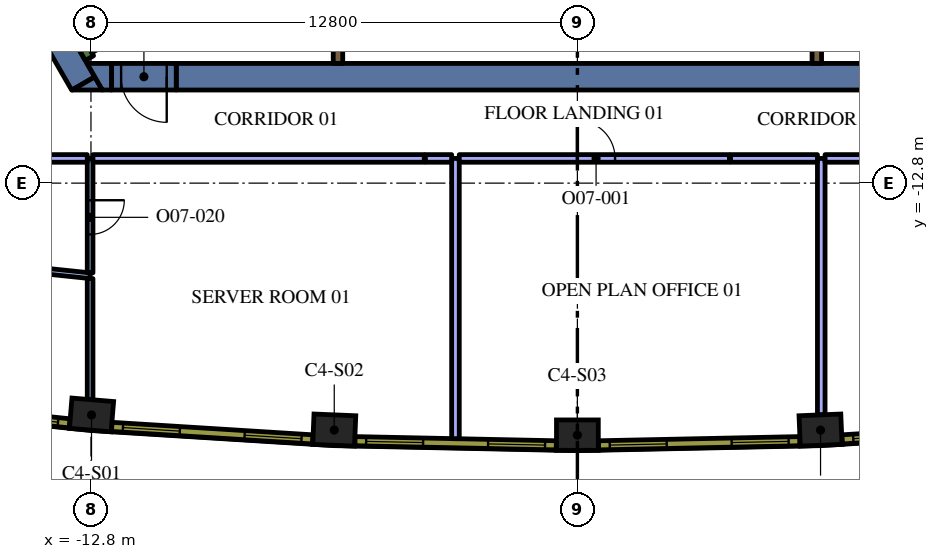
"""IFC4 building model, lengths in metres.
Left out: names, types, materials, properties, quantities, classifications, styles, units other than length and angle.
Written with IfcOpenShell. Run it as: python <this file> out.ifc"""

import sys

from ifc_helpers import new_model, si_unit, direction, frame, frame_2d, origin, origin_2d, place, context, subcontext, project, spatial, polyline, rectangle, outline, extrude, element, fill, save


model = new_model("IFC4")
c1 = context("Model", 3, precision=1e-05, world=origin(), true_north=direction((0.0, 1.0)))
c2 = subcontext(c1, "Body", "Model", "MODEL_VIEW")
j1 = project(units=[si_unit("LENGTHUNIT", "METRE"), si_unit("PLANEANGLEUNIT", "RADIAN")], contexts=[c1])
p1 = place(None, origin())
s1 = spatial("IfcSite", under=j1, at=p1, CompositionType="ELEMENT")
p2 = place(p1, origin())
s2 = spatial("IfcBuilding", under=s1, at=p2, CompositionType="ELEMENT")
p3 = place(p2, frame((0.0, 0.0, 214.2)))
s3 = spatial("IfcBuildingStorey", under=s2, at=p3, CompositionType="ELEMENT", Elevation=214.2)
for number, where, z_axis, x_axis in (
    (1, (-12.785, -18.9, 0.0), (0.0, 0.0, 1.0), (0.997, -0.083, 0.0)),
    (2, (-6.398, -19.298, 0.0), (0.0, 0.0, 1.0), (0.999, -0.041, 0.0)),
    (3, (0.0, -19.431, 0.0), (0.0, 0.0, 1.0), (1.0, 0.0, 0.0)),
    (4, (6.398, -19.298, 0.0), (0.0, 0.0, 1.0), (0.999, 0.041, 0.0)),
):
    element("IfcColumn", number, at=place(p3, frame(where, z_axis=z_axis, x_axis=x_axis)), inside=s3, PredefinedType="COLUMN", context=c2, shape_type="SweptSolid", body=[
        extrude(rectangle(XDim=1.1, YDim=0.8, at=origin_2d()), origin(), (0.0, 0.0, 1.0), 4.2),
    ])
p4 = place(p3, frame((-14.917, -6.863, 0.0), z_axis=(0.0, 0.0, 1.0), x_axis=(0.499972675833, -0.866041178825, 0.0)))
e5 = element("IfcWall", 5, at=p4, inside=s3, PredefinedType="SOLIDWALL", context=c2, shape_type="SweptSolid", body=[
    extrude(rectangle(XDim=3.829, YDim=0.7, at=frame_2d((1.915, 0.0))), origin(), (0.0, 0.0, 1.0), 4.2),
])
p5 = place(p3, origin())
e6 = element("IfcWall", 6, at=p5, inside=s3, PredefinedType="SOLIDWALL", context=c2, shape_type="SweptSolid", body=[
    extrude(outline(polyline([(-12.5, -10.35), (-13.296, -10.35), (-12.698, -10.005), (-12.5, -10.35)])), origin(), (0.0, 0.0, 1.0), 4.2),
])
e7 = element("IfcWall", 7, at=p5, inside=s3, PredefinedType="SOLIDWALL", context=c2, shape_type="SweptSolid", body=[
    extrude(outline(polyline([(-12.257, -10.35), (-12.5, -10.35), (-12.904, -9.65), (-12.257, -9.65), (-12.257, -10.35)])), origin(), (0.0, 0.0, 1.0), 4.2),
])
p6 = place(p3, frame((-10.556, -10.0, 0.0), z_axis=(0.0, 0.0, 1.0), x_axis=(1.0, 0.0, 0.0)))
e8 = element("IfcWall", 8, at=p6, inside=s3, PredefinedType="SOLIDWALL", context=c2, shape_type="SweptSolid", body=[
    extrude(rectangle(XDim=19.461, YDim=0.7, at=frame_2d((9.73, 0.0))), origin(), (0.0, 0.0, 1.0), 4.2),
])
p7 = place(p3, frame((12.84, -9.261, 0.0), z_axis=(0.0, 0.0, 1.0), x_axis=(-0.866013990052, 0.500019768644, 0.0)))
e9 = element("IfcWall", 9, at=p7, inside=s3, PredefinedType="SOLIDWALL", context=c2, shape_type="SweptSolid", body=[
    extrude(rectangle(XDim=6.8, YDim=0.25, at=frame_2d((3.4, 0.0))), origin(), (0.0, 0.0, 1.0), 4.2),
])
p8 = place(p3, frame((-12.84, -9.511, 0.0), z_axis=(0.0, 0.0, 1.0), x_axis=(-0.500048121057, 0.865997619297, 0.0)))
e10 = element("IfcWall", 10, at=p8, inside=s3, PredefinedType="SOLIDWALL", context=c2, shape_type="SweptSolid", body=[
    extrude(rectangle(XDim=3.634, YDim=0.25, at=frame_2d((1.817, 0.0))), origin(), (0.0, 0.0, 1.0), 4.2),
])
p9 = place(p3, frame((-12.84, -9.261, 0.0), z_axis=(0.0, 0.0, 1.0), x_axis=(0.866016039709, 0.500016218704, 0.0)))
e11 = element("IfcWall", 11, at=p9, inside=s3, PredefinedType="SOLIDWALL", context=c2, shape_type="SweptSolid", body=[
    extrude(rectangle(XDim=7.05, YDim=0.25, at=frame_2d((3.525, 0.0))), origin(), (0.0, 0.0, 1.0), 4.2),
])
p10 = place(p3, frame((-6.3, -9.052, 0.0), z_axis=(0.0, 0.0, 1.0), x_axis=(0.0, -1.0, 0.0)))
e12 = element("IfcWall", 12, at=p10, inside=s3, PredefinedType="SOLIDWALL", context=c2, shape_type="SweptSolid", body=[
    extrude(rectangle(XDim=0.598, YDim=0.25, at=frame_2d((0.299, 0.0))), origin(), (0.0, 0.0, 1.0), 4.2),
])
p11 = place(p3, frame((6.3, -9.65, 0.0), z_axis=(0.0, 0.0, 1.0), x_axis=(0.0, 1.0, 0.0)))
e13 = element("IfcWall", 13, at=p11, inside=s3, PredefinedType="SOLIDWALL", context=c2, shape_type="SweptSolid", body=[
    extrude(rectangle(XDim=1.008, YDim=0.25, at=frame_2d((0.504, 0.0))), origin(), (0.0, 0.0, 1.0), 4.2),
])
p12 = place(p3, frame((-10.556, -10.0, 0.0), z_axis=(0.0, 0.0, 1.0), x_axis=(-1.0, 0.0, 0.0)))
e14 = element("IfcWall", 14, at=p12, inside=s3, PredefinedType="SOLIDWALL", context=c2, shape_type="SweptSolid", body=[
    extrude(rectangle(XDim=1.7, YDim=0.7, at=frame_2d((0.85, 0.0))), origin(), (0.0, 0.0, 1.0), 4.2),
])
p13 = place(p12, frame((0.25, 0.0, 0.0)))
e15 = element("IfcOpeningElement", 15, at=p13, cuts=e14, PredefinedType="OPENING", context=c2, shape_type="SweptSolid", body=[
    extrude(rectangle(XDim=1.2, YDim=2.1, at=frame_2d((0.6, 1.05))), frame((0.0, 0.36, 0.0), z_axis=(0.0, -1.0, 0.0), x_axis=(1.0, 0.0, 0.0)), (0.0, 0.0, 1.0), 0.72),
])
p14 = place(p3, frame((6.417, -12.15, 0.0), z_axis=(0.0, 0.0, 1.0), x_axis=(0.0, -1.0, 0.0)))
e16 = element("IfcWall", 16, at=p14, inside=s3, PredefinedType="PARTITIONING", context=c2, shape_type="SweptSolid", body=[
    extrude(rectangle(XDim=6.747, YDim=0.2, at=frame_2d((3.374, 0.0))), origin(), (0.0, 0.0, 1.0), 3.45),
])
p15 = place(p3, frame((-3.208, -19.524, 0.0), z_axis=(0.0, 0.0, 1.0), x_axis=(0.0, 1.0, 0.0)))
e17 = element("IfcWall", 17, at=p15, inside=s3, PredefinedType="PARTITIONING", context=c2, shape_type="SweptSolid", body=[
    extrude(rectangle(XDim=7.374, YDim=0.2, at=frame_2d((3.687, 0.0))), origin(), (0.0, 0.0, 1.0), 3.45),
])
p16 = place(p3, frame((-3.108, -12.15, 0.0), z_axis=(0.0, 0.0, 1.0), x_axis=(1.0, 0.0, 0.0)))
e18 = element("IfcWall", 18, at=p16, inside=s3, PredefinedType="PARTITIONING", context=c2, shape_type="SweptSolid", body=[
    extrude(rectangle(XDim=7.108, YDim=0.2, at=frame_2d((3.554, 0.0))), origin(), (0.0, 0.0, 1.0), 3.45),
])
p17 = place(p16, frame((3.1, 0.0, 0.0)))
e19 = element("IfcOpeningElement", 19, at=p17, cuts=e18, PredefinedType="OPENING", context=c2, shape_type="SweptSolid", body=[
    extrude(rectangle(XDim=1.0, YDim=2.1, at=frame_2d((0.5, 1.05))), frame((0.0, 0.11, 0.0), z_axis=(0.0, -1.0, 0.0), x_axis=(1.0, 0.0, 0.0)), (0.0, 0.0, 1.0), 0.22),
])
p18 = place(p3, frame((4.03, -12.15, 0.0), z_axis=(0.0, 0.0, 1.0), x_axis=(1.0, 0.0, 0.0)))
e20 = element("IfcWall", 20, at=p18, inside=s3, PredefinedType="PARTITIONING", context=c2, shape_type="SweptSolid", body=[
    extrude(rectangle(XDim=2.287, YDim=0.2, at=frame_2d((1.144, 0.0))), origin(), (0.0, 0.0, 1.0), 3.45),
])
p19 = place(p3, frame((6.517, -12.15, 0.0), z_axis=(0.0, 0.0, 1.0), x_axis=(1.0, 0.0, 0.0)))
e21 = element("IfcWall", 21, at=p19, inside=s3, PredefinedType="PARTITIONING", context=c2, shape_type="SweptSolid", body=[
    extrude(rectangle(XDim=7.83, YDim=0.2, at=frame_2d((3.915, 0.0))), origin(), (0.0, 0.0, 1.0), 3.45),
])
p20 = place(p19, frame((3.4, 0.0, 0.0)))
e22 = element("IfcOpeningElement", 22, at=p20, cuts=e21, PredefinedType="OPENING", context=c2, shape_type="SweptSolid", body=[
    extrude(rectangle(XDim=1.0, YDim=2.1, at=frame_2d((0.5, 1.05))), frame((0.0, 0.11, 0.0), z_axis=(0.0, -1.0, 0.0), x_axis=(1.0, 0.0, 0.0)), (0.0, 0.0, 1.0), 0.22),
])
p21 = place(p3, frame((-12.823, -15.236, 0.0), z_axis=(0.0, 0.0, 1.0), x_axis=(-0.994621582944, 0.10357560882, 0.0)))
e23 = element("IfcWall", 23, at=p21, inside=s3, PredefinedType="PARTITIONING", context=c2, shape_type="SweptSolid", body=[
    extrude(rectangle(XDim=3.632, YDim=0.15, at=frame_2d((1.816, 0.0))), origin(), (0.0, 0.0, 1.0), 3.45),
])
p22 = place(p21, frame((1.332, 0.0, 0.0)))
e24 = element("IfcOpeningElement", 24, at=p22, cuts=e23, PredefinedType="OPENING", context=c2, shape_type="SweptSolid", body=[
    extrude(rectangle(XDim=0.9, YDim=2.1, at=frame_2d((0.45, 1.05))), frame((0.0, 0.085, 0.0), z_axis=(0.0, -1.0, 0.0), x_axis=(1.0, 0.0, 0.0)), (0.0, 0.0, 1.0), 0.17),
])
p23 = place(p3, frame((-12.823, -15.312, 0.0), z_axis=(0.0, 0.0, 1.0), x_axis=(0.0, -1.0, 0.0)))
e25 = element("IfcWall", 25, at=p23, inside=s3, PredefinedType="PARTITIONING", context=c2, shape_type="SweptSolid", body=[
    extrude(rectangle(XDim=3.184, YDim=0.15, at=frame_2d((1.592, 0.0))), origin(), (0.0, 0.0, 1.0), 3.45),
])
p24 = place(p3, frame((-12.823, -12.15, 0.0), z_axis=(0.0, 0.0, 1.0), x_axis=(0.0, -1.0, 0.0)))
e26 = element("IfcWall", 26, at=p24, inside=s3, PredefinedType="PARTITIONING", context=c2, shape_type="SweptSolid", body=[
    extrude(rectangle(XDim=3.011, YDim=0.15, at=frame_2d((1.505, 0.0))), origin(), (0.0, 0.0, 1.0), 3.45),
])
p25 = place(p24, frame((1.1, 0.0, 0.0)))
e27 = element("IfcOpeningElement", 27, at=p25, cuts=e26, PredefinedType="OPENING", context=c2, shape_type="SweptSolid", body=[
    extrude(rectangle(XDim=0.9, YDim=2.1, at=frame_2d((0.45, 1.05))), frame((0.0, 0.085, 0.0), z_axis=(0.0, -1.0, 0.0), x_axis=(1.0, 0.0, 0.0)), (0.0, 0.0, 1.0), 0.17),
])
p26 = place(p3, frame((-14.317, -12.15, 0.0), z_axis=(0.0, 0.0, 1.0), x_axis=(1.0, 0.0, 0.0)))
e28 = element("IfcWall", 28, at=p26, inside=s3, PredefinedType="PARTITIONING", context=c2, shape_type="SweptSolid", body=[
    extrude(rectangle(XDim=1.419, YDim=0.2, at=frame_2d((0.71, 0.0))), origin(), (0.0, 0.0, 1.0), 3.45),
])
p27 = place(p3, frame((-4.0, -12.15, 0.0), z_axis=(0.0, 0.0, 1.0), x_axis=(1.0, 0.0, 0.0)))
e29 = element("IfcWall", 29, at=p27, inside=s3, PredefinedType="PARTITIONING", context=c2, shape_type="SweptSolid", body=[
    extrude(rectangle(XDim=0.692, YDim=0.2, at=frame_2d((0.346, 0.0))), origin(), (0.0, 0.0, 1.0), 3.45),
])
p28 = place(p3, frame((-12.748, -12.15, 0.0), z_axis=(0.0, 0.0, 1.0), x_axis=(1.0, 0.0, 0.0)))
e30 = element("IfcWall", 30, at=p28, inside=s3, PredefinedType="PARTITIONING", context=c2, shape_type="SweptSolid", body=[
    extrude(rectangle(XDim=8.718, YDim=0.2, at=frame_2d((4.359, 0.0))), origin(), (0.0, 0.0, 1.0), 3.45),
])
p29 = place(p3, frame((-18.644, -18.571, 0.0), z_axis=(0.0, 0.0, 1.0), x_axis=(0.994621961215, -0.103571976272, 0.0)))
e31 = element("IfcWall", 31, at=p29, inside=s3, PredefinedType="SOLIDWALL", context=c2, shape_type="SweptSolid", body=[
    extrude(rectangle(XDim=5.311, YDim=0.24, at=frame_2d((2.655, 0.0))), origin(), (0.0, 0.0, 1.0), 3.95),
])
p30 = place(p29, frame((0.271, 0.0, 0.9)))
e32 = element("IfcOpeningElement", 32, at=p30, cuts=e31, PredefinedType="OPENING", context=c2, shape_type="SweptSolid", body=[
    extrude(rectangle(XDim=1.5, YDim=2.55, at=frame_2d((0.75, 1.275))), frame((0.0, 0.13, 0.0), z_axis=(0.0, -1.0, 0.0), x_axis=(1.0, 0.0, 0.0)), (0.0, 0.0, 1.0), 0.26),
])
p31 = place(p29, frame((3.504, 0.0, 0.9)))
e33 = element("IfcOpeningElement", 33, at=p31, cuts=e31, PredefinedType="OPENING", context=c2, shape_type="SweptSolid", body=[
    extrude(rectangle(XDim=1.5, YDim=2.55, at=frame_2d((0.75, 1.275))), frame((0.0, 0.13, 0.0), z_axis=(0.0, -1.0, 0.0), x_axis=(1.0, 0.0, 0.0)), (0.0, 0.0, 1.0), 0.26),
])
p32 = place(p3, frame((-12.253, -19.213, 0.0), z_axis=(0.0, 0.0, 1.0), x_axis=(0.9980633213, -0.062206162685, 0.0)))
e34 = element("IfcWall", 34, at=p32, inside=s3, PredefinedType="SOLIDWALL", context=c2, shape_type="SweptSolid", body=[
    extrude(rectangle(XDim=5.298, YDim=0.24, at=frame_2d((2.649, 0.0))), origin(), (0.0, 0.0, 1.0), 3.95),
])
p33 = place(p32, frame((0.294, 0.0, 0.9)))
e35 = element("IfcOpeningElement", 35, at=p33, cuts=e34, PredefinedType="OPENING", context=c2, shape_type="SweptSolid", body=[
    extrude(rectangle(XDim=1.5, YDim=2.55, at=frame_2d((0.75, 1.275))), frame((0.0, 0.13, 0.0), z_axis=(0.0, -1.0, 0.0), x_axis=(1.0, 0.0, 0.0)), (0.0, 0.0, 1.0), 0.26),
])
p34 = place(p32, frame((3.504, 0.0, 0.9)))
e36 = element("IfcOpeningElement", 36, at=p34, cuts=e34, PredefinedType="OPENING", context=c2, shape_type="SweptSolid", body=[
    extrude(rectangle(XDim=1.5, YDim=2.55, at=frame_2d((0.75, 1.275))), frame((0.0, 0.13, 0.0), z_axis=(0.0, -1.0, 0.0), x_axis=(1.0, 0.0, 0.0)), (0.0, 0.0, 1.0), 0.26),
])
p35 = place(p3, frame((-5.854, -19.589, 0.0), z_axis=(0.0, 0.0, 1.0), x_axis=(0.999784035184, -0.020781794712, 0.0)))
e37 = element("IfcWall", 37, at=p35, inside=s3, PredefinedType="SOLIDWALL", context=c2, shape_type="SweptSolid", body=[
    extrude(rectangle(XDim=5.298, YDim=0.24, at=frame_2d((2.649, 0.0))), origin(), (0.0, 0.0, 1.0), 3.95),
])
p36 = place(p35, frame((0.294, 0.0, 0.9)))
e38 = element("IfcOpeningElement", 38, at=p36, cuts=e37, PredefinedType="OPENING", context=c2, shape_type="SweptSolid", body=[
    extrude(rectangle(XDim=1.5, YDim=2.55, at=frame_2d((0.75, 1.275))), frame((0.0, 0.13, 0.0), z_axis=(0.0, -1.0, 0.0), x_axis=(1.0, 0.0, 0.0)), (0.0, 0.0, 1.0), 0.26),
])
p37 = place(p35, frame((3.504, 0.0, 0.9)))
e39 = element("IfcOpeningElement", 39, at=p37, cuts=e37, PredefinedType="OPENING", context=c2, shape_type="SweptSolid", body=[
    extrude(rectangle(XDim=1.5, YDim=2.55, at=frame_2d((0.75, 1.275))), frame((0.0, 0.13, 0.0), z_axis=(0.0, -1.0, 0.0), x_axis=(1.0, 0.0, 0.0)), (0.0, 0.0, 1.0), 0.26),
])
p38 = place(p3, frame((0.556, -19.699, 0.0), z_axis=(0.0, 0.0, 1.0), x_axis=(0.999784035184, 0.020781794712, 0.0)))
e40 = element("IfcWall", 40, at=p38, inside=s3, PredefinedType="SOLIDWALL", context=c2, shape_type="SweptSolid", body=[
    extrude(rectangle(XDim=5.298, YDim=0.24, at=frame_2d((2.649, 0.0))), origin(), (0.0, 0.0, 1.0), 3.95),
])
p39 = place(p38, frame((0.294, 0.0, 0.9)))
e41 = element("IfcOpeningElement", 41, at=p39, cuts=e40, PredefinedType="OPENING", context=c2, shape_type="SweptSolid", body=[
    extrude(rectangle(XDim=1.5, YDim=2.55, at=frame_2d((0.75, 1.275))), frame((0.0, 0.13, 0.0), z_axis=(0.0, -1.0, 0.0), x_axis=(1.0, 0.0, 0.0)), (0.0, 0.0, 1.0), 0.26),
])
p40 = place(p38, frame((3.504, 0.0, 0.9)))
e42 = element("IfcOpeningElement", 42, at=p40, cuts=e40, PredefinedType="OPENING", context=c2, shape_type="SweptSolid", body=[
    extrude(rectangle(XDim=1.5, YDim=2.55, at=frame_2d((0.75, 1.275))), frame((0.0, 0.13, 0.0), z_axis=(0.0, -1.0, 0.0), x_axis=(1.0, 0.0, 0.0)), (0.0, 0.0, 1.0), 0.26),
])
p41 = place(p3, frame((6.965, -19.543, 0.0), z_axis=(0.0, 0.0, 1.0), x_axis=(0.9980633213, 0.062206162685, 0.0)))
e43 = element("IfcWall", 43, at=p41, inside=s3, PredefinedType="SOLIDWALL", context=c2, shape_type="SweptSolid", body=[
    extrude(rectangle(XDim=5.298, YDim=0.24, at=frame_2d((2.649, 0.0))), origin(), (0.0, 0.0, 1.0), 3.95),
])
p42 = place(p41, frame((0.295, 0.0, 0.9)))
e44 = element("IfcOpeningElement", 44, at=p42, cuts=e43, PredefinedType="OPENING", context=c2, shape_type="SweptSolid", body=[
    extrude(rectangle(XDim=1.5, YDim=2.55, at=frame_2d((0.75, 1.275))), frame((0.0, 0.13, 0.0), z_axis=(0.0, -1.0, 0.0), x_axis=(1.0, 0.0, 0.0)), (0.0, 0.0, 1.0), 0.26),
])
p43 = place(p41, frame((3.504, 0.0, 0.9)))
e45 = element("IfcOpeningElement", 45, at=p43, cuts=e43, PredefinedType="OPENING", context=c2, shape_type="SweptSolid", body=[
    extrude(rectangle(XDim=1.5, YDim=2.55, at=frame_2d((0.75, 1.275))), frame((0.0, 0.13, 0.0), z_axis=(0.0, -1.0, 0.0), x_axis=(1.0, 0.0, 0.0)), (0.0, 0.0, 1.0), 0.26),
])
p44 = place(p13, origin())
e46 = element("IfcDoor", 46, at=p44, inside=s3, OperationType="SINGLE_SWING_LEFT", PredefinedType="DOOR", context=c2, shape_type="SweptSolid", body=[
    extrude(rectangle(XDim=1.2, YDim=2.1, at=frame_2d((0.6, 1.05))), frame((0.0, 0.025, 0.0), z_axis=(0.0, -1.0, 0.0), x_axis=(1.0, 0.0, 0.0)), (0.0, 0.0, 1.0), 0.05),
])
fill(e15, e46)
p45 = place(p17, origin())
e47 = element("IfcDoor", 47, at=p45, inside=s3, OperationType="SINGLE_SWING_RIGHT", PredefinedType="DOOR", context=c2, shape_type="SweptSolid", body=[
    extrude(rectangle(XDim=1.0, YDim=2.1, at=frame_2d((0.5, 1.05))), frame((0.0, 0.025, 0.0), z_axis=(0.0, -1.0, 0.0), x_axis=(1.0, 0.0, 0.0)), (0.0, 0.0, 1.0), 0.05),
])
fill(e19, e47)
p46 = place(p25, origin())
e48 = element("IfcDoor", 48, at=p46, inside=s3, OperationType="SINGLE_SWING_RIGHT", PredefinedType="DOOR", context=c2, shape_type="SweptSolid", body=[
    extrude(rectangle(XDim=0.9, YDim=2.1, at=frame_2d((0.45, 1.05))), frame((0.0, 0.025, 0.0), z_axis=(0.0, -1.0, 0.0), x_axis=(1.0, 0.0, 0.0)), (0.0, 0.0, 1.0), 0.05),
])
fill(e27, e48)
p47 = place(p31, origin())
e49 = element("IfcWindow", 49, at=p47, inside=s3, PartitioningType="SINGLE_PANEL", PredefinedType="WINDOW", context=c2, shape_type="SweptSolid", body=[
    extrude(rectangle(XDim=1.5, YDim=2.55, at=frame_2d((0.75, 1.275))), frame((0.0, 0.04, 0.0), z_axis=(0.0, -1.0, 0.0), x_axis=(1.0, 0.0, 0.0)), (0.0, 0.0, 1.0), 0.06),
])
fill(e33, e49)
p48 = place(p33, origin())
e50 = element("IfcWindow", 50, at=p48, inside=s3, PartitioningType="SINGLE_PANEL", PredefinedType="WINDOW", context=c2, shape_type="SweptSolid", body=[
    extrude(rectangle(XDim=1.5, YDim=2.55, at=frame_2d((0.75, 1.275))), frame((0.0, 0.04, 0.0), z_axis=(0.0, -1.0, 0.0), x_axis=(1.0, 0.0, 0.0)), (0.0, 0.0, 1.0), 0.06),
])
fill(e35, e50)
p49 = place(p34, origin())
e51 = element("IfcWindow", 51, at=p49, inside=s3, PartitioningType="SINGLE_PANEL", PredefinedType="WINDOW", context=c2, shape_type="SweptSolid", body=[
    extrude(rectangle(XDim=1.5, YDim=2.55, at=frame_2d((0.75, 1.275))), frame((0.0, 0.04, 0.0), z_axis=(0.0, -1.0, 0.0), x_axis=(1.0, 0.0, 0.0)), (0.0, 0.0, 1.0), 0.06),
])
fill(e36, e51)
p50 = place(p36, origin())
e52 = element("IfcWindow", 52, at=p50, inside=s3, PartitioningType="SINGLE_PANEL", PredefinedType="WINDOW", context=c2, shape_type="SweptSolid", body=[
    extrude(rectangle(XDim=1.5, YDim=2.55, at=frame_2d((0.75, 1.275))), frame((0.0, 0.04, 0.0), z_axis=(0.0, -1.0, 0.0), x_axis=(1.0, 0.0, 0.0)), (0.0, 0.0, 1.0), 0.06),
])
fill(e38, e52)
p51 = place(p37, origin())
e53 = element("IfcWindow", 53, at=p51, inside=s3, PartitioningType="SINGLE_PANEL", PredefinedType="WINDOW", context=c2, shape_type="SweptSolid", body=[
    extrude(rectangle(XDim=1.5, YDim=2.55, at=frame_2d((0.75, 1.275))), frame((0.0, 0.04, 0.0), z_axis=(0.0, -1.0, 0.0), x_axis=(1.0, 0.0, 0.0)), (0.0, 0.0, 1.0), 0.06),
])
fill(e39, e53)
p52 = place(p39, origin())
e54 = element("IfcWindow", 54, at=p52, inside=s3, PartitioningType="SINGLE_PANEL", PredefinedType="WINDOW", context=c2, shape_type="SweptSolid", body=[
    extrude(rectangle(XDim=1.5, YDim=2.55, at=frame_2d((0.75, 1.275))), frame((0.0, 0.04, 0.0), z_axis=(0.0, -1.0, 0.0), x_axis=(1.0, 0.0, 0.0)), (0.0, 0.0, 1.0), 0.06),
])
fill(e41, e54)
p53 = place(p40, origin())
e55 = element("IfcWindow", 55, at=p53, inside=s3, PartitioningType="SINGLE_PANEL", PredefinedType="WINDOW", context=c2, shape_type="SweptSolid", body=[
    extrude(rectangle(XDim=1.5, YDim=2.55, at=frame_2d((0.75, 1.275))), frame((0.0, 0.04, 0.0), z_axis=(0.0, -1.0, 0.0), x_axis=(1.0, 0.0, 0.0)), (0.0, 0.0, 1.0), 0.06),
])
fill(e42, e55)
p54 = place(p42, origin())
e56 = element("IfcWindow", 56, at=p54, inside=s3, PartitioningType="SINGLE_PANEL", PredefinedType="WINDOW", context=c2, shape_type="SweptSolid", body=[
    extrude(rectangle(XDim=1.5, YDim=2.55, at=frame_2d((0.75, 1.275))), frame((0.0, 0.04, 0.0), z_axis=(0.0, -1.0, 0.0), x_axis=(1.0, 0.0, 0.0)), (0.0, 0.0, 1.0), 0.06),
])
fill(e44, e56)
save(model, sys.argv[1])
